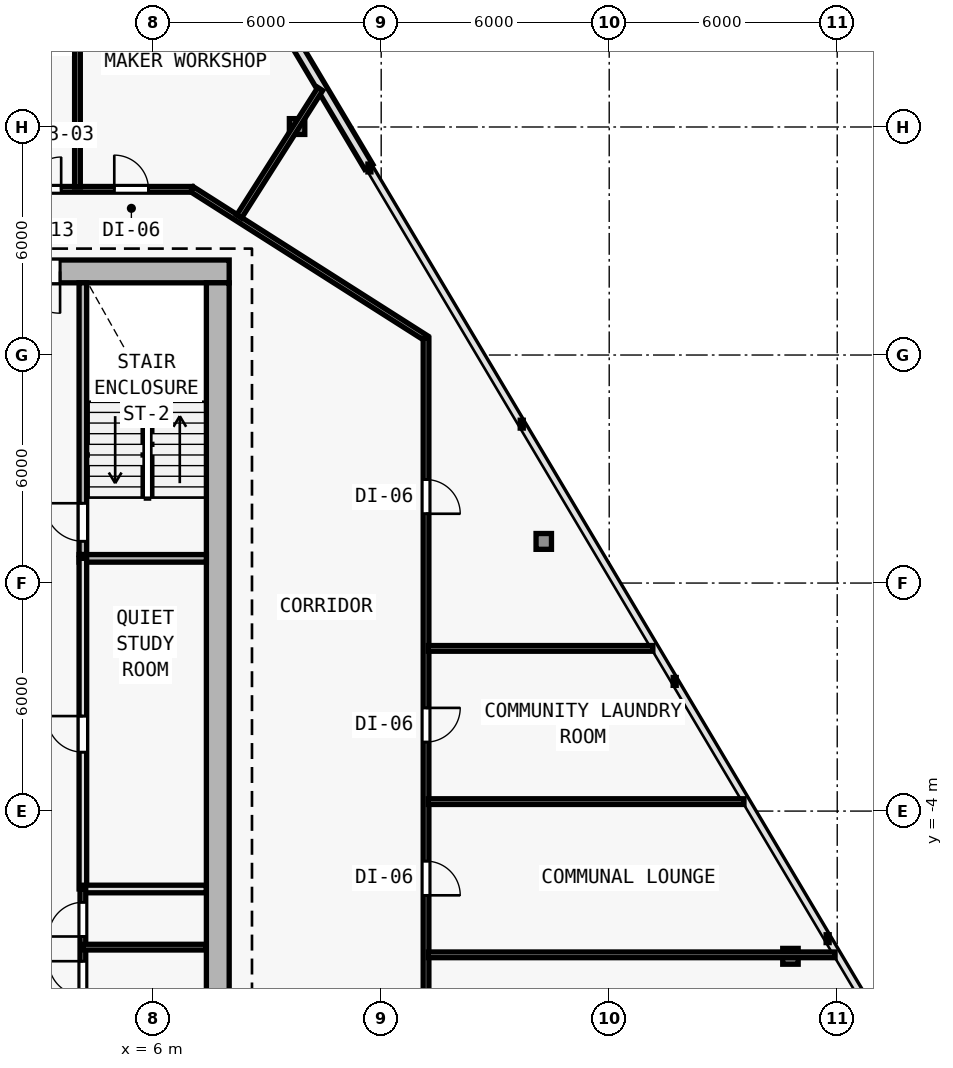
"""IFC4 building model, lengths in metres.
Left out: names, types, materials, properties, quantities, classifications, styles, units other than length and angle.
Written with IfcOpenShell. Run it as: python <this file> out.ifc"""

import sys

from ifc_helpers import new_model, si_unit, direction, frame, frame_2d, origin, origin_2d, place, context, subcontext, project, spatial, rectangle, i_section, extrude, element, fill, save


model = new_model("IFC4")
c1 = context("Model", 3, precision=1e-05, world=origin(), true_north=direction((0.0, 1.0)))
c2 = subcontext(c1, "Body", "Model", "MODEL_VIEW")
j1 = project(units=[si_unit("LENGTHUNIT", "METRE"), si_unit("PLANEANGLEUNIT", "RADIAN")], contexts=[c1])
p1 = place(None, origin())
s1 = spatial("IfcSite", under=j1, at=p1, CompositionType="ELEMENT")
p2 = place(p1, origin())
s2 = spatial("IfcBuilding", under=s1, at=p2, CompositionType="ELEMENT")
p3 = place(p2, frame((0.0, 0.0, 122.1)))
s3 = spatial("IfcBuildingStorey", under=s2, at=p3, CompositionType="ELEMENT", Elevation=122.1)
for number, where, z_axis, x_axis in (
    (1, (7.7, 10.2, 0.0), (0.0, 0.0, 1.0), (1.0, 0.0, 0.0)),
    (2, (7.7, 0.4, 0.0), (0.0, 0.0, 1.0), (1.0, 0.0, 0.0)),
):
    element("IfcColumn", number, at=place(p3, frame(where, z_axis=z_axis, x_axis=x_axis)), inside=s3, PredefinedType="COLUMN", context=c2, shape_type="SweptSolid", body=[
        extrude(i_section(OverallWidth=0.409, OverallDepth=0.425, WebThickness=0.021, FlangeThickness=0.034, FilletRadius=0.015, at=origin_2d()), origin(), (0.0, 0.0, 1.0), 3.6),
    ])
p4 = place(p3, frame((22.769, -7.821, 0.005), z_axis=(-0.026105663043, 0.021618752208, 0.999425396871), x_axis=(-0.637813971185, -0.770190455771, 0.0)))
e3 = element("IfcColumn", 3, at=p4, inside=s3, PredefinedType="COLUMN", context=c2, shape_type="SweptSolid", body=[
    extrude(i_section(OverallWidth=0.406, OverallDepth=0.416, WebThickness=0.019, FlangeThickness=0.031, FilletRadius=0.015, at=origin_2d()), origin(), (0.0, 0.0, 1.0), 3.591),
])
p5 = place(p3, frame((16.278, 3.096, 0.005), z_axis=(-0.018906041, 0.009521027842, 0.999775930718), x_axis=(-0.449781931574, -0.893138406984, 0.0)))
e4 = element("IfcColumn", 4, at=p5, inside=s3, PredefinedType="COLUMN", context=c2, shape_type="SweptSolid", body=[
    extrude(i_section(OverallWidth=0.406, OverallDepth=0.416, WebThickness=0.019, FlangeThickness=0.031, FilletRadius=0.015, at=origin_2d()), origin(), (0.0, 0.0, 1.0), 3.59),
])
p6 = place(p3, frame((9.787, 14.012, 0.005), z_axis=(-0.011767054935, -0.002516653368, 0.999927598816), x_axis=(0.209143047003, -0.977885057607, 0.0)))
e5 = element("IfcColumn", 5, at=p6, inside=s3, PredefinedType="COLUMN", context=c2, shape_type="SweptSolid", body=[
    extrude(i_section(OverallWidth=0.406, OverallDepth=0.416, WebThickness=0.019, FlangeThickness=0.031, FilletRadius=0.015, at=origin_2d()), origin(), (0.0, 0.0, 1.0), 3.589),
])
p7 = place(p3, frame((6.017, 22.462, 0.0), z_axis=(0.0, 0.0, 1.0), x_axis=(0.511085523564, -0.859529864288, 0.0)))
e6 = element("IfcWall", 6, at=p7, inside=s3, PredefinedType="SOLIDWALL", context=c2, shape_type="SweptSolid", body=[
    extrude(rectangle(XDim=11.068, YDim=0.25, at=frame_2d((5.534, 0.0))), origin(), (0.0, 0.0, 1.0), 3.35),
])
p8 = place(p7, frame((4.634, 0.0, 0.62)))
e7 = element("IfcOpeningElement", 7, at=p8, cuts=e6, PredefinedType="OPENING", context=c2, shape_type="SweptSolid", body=[
    extrude(rectangle(XDim=1.8, YDim=2.1, at=frame_2d((0.9, 1.05))), frame((0.0, 0.135, 0.0), z_axis=(0.0, -1.0, 0.0), x_axis=(1.0, 0.0, 0.0)), (0.0, 0.0, 1.0), 0.27),
])
p9 = place(p3, frame((8.0, 10.2, 0.0), z_axis=(0.0, 0.0, 1.0), x_axis=(-1.0, 0.0, 0.0)))
e8 = element("IfcWall", 8, at=p9, inside=s3, PredefinedType="SHEAR", context=c2, shape_type="SweptSolid", body=[
    extrude(rectangle(XDim=16.0, YDim=0.6, at=frame_2d((8.0, 0.0))), origin(), (0.0, 0.0, 1.0), 3.35),
])
p10 = place(p9, frame((4.45, 0.0, 0.0)))
e9 = element("IfcOpeningElement", 9, at=p10, cuts=e8, PredefinedType="OPENING", context=c2, shape_type="SweptSolid", body=[
    extrude(rectangle(XDim=1.1, YDim=2.15, at=frame_2d((0.55, 1.075))), frame((0.0, 0.31, 0.0), z_axis=(0.0, -1.0, 0.0), x_axis=(1.0, 0.0, 0.0)), (0.0, 0.0, 1.0), 0.62),
])
p11 = place(p3, frame((7.7, 9.9, 0.0), z_axis=(0.0, 0.0, 1.0), x_axis=(0.0, -1.0, 0.0)))
e10 = element("IfcWall", 10, at=p11, inside=s3, PredefinedType="SHEAR", context=c2, shape_type="SweptSolid", body=[
    extrude(rectangle(XDim=19.0, YDim=0.6, at=frame_2d((9.5, 0.0))), origin(), (0.0, 0.0, 1.0), 3.35),
])
p12 = place(p3, frame((4.15, 2.75, 0.0), z_axis=(0.0, 0.0, 1.0), x_axis=(0.0, 1.0, 0.0)))
e11 = element("IfcWall", 11, at=p12, inside=s3, PredefinedType="SOLIDWALL", context=c2, shape_type="SweptSolid", body=[
    extrude(rectangle(XDim=7.15, YDim=0.2, at=frame_2d((3.575, 0.0))), origin(), (0.0, 0.0, 1.0), 3.35),
])
p13 = place(p12, frame((0.35, 0.0, 0.0)))
e12 = element("IfcOpeningElement", 12, at=p13, cuts=e11, PredefinedType="OPENING", context=c2, shape_type="SweptSolid", body=[
    extrude(rectangle(XDim=1.0, YDim=2.15, at=frame_2d((0.5, 1.075))), frame((0.0, 0.11, 0.0), z_axis=(0.0, -1.0, 0.0), x_axis=(1.0, 0.0, 0.0)), (0.0, 0.0, 1.0), 0.22),
])
p14 = place(p3, frame((4.05, 2.65, 0.0), z_axis=(0.0, 0.0, 1.0), x_axis=(1.0, 0.0, 0.0)))
e13 = element("IfcWall", 13, at=p14, inside=s3, PredefinedType="SOLIDWALL", context=c2, shape_type="SweptSolid", body=[
    extrude(rectangle(XDim=3.35, YDim=0.2, at=frame_2d((1.675, 0.0))), origin(), (0.0, 0.0, 1.0), 3.35),
])
p15 = place(p3, frame((4.15, -6.05, 0.0), z_axis=(0.0, 0.0, 1.0), x_axis=(0.0, 1.0, 0.0)))
e14 = element("IfcWall", 14, at=p15, inside=s3, PredefinedType="SOLIDWALL", context=c2, shape_type="SweptSolid", body=[
    extrude(rectangle(XDim=8.7, YDim=0.2, at=frame_2d((4.35, 0.0))), origin(), (0.0, 0.0, 1.0), 3.35),
])
p16 = place(p15, frame((3.6, 0.0, 0.0)))
e15 = element("IfcOpeningElement", 15, at=p16, cuts=e14, PredefinedType="OPENING", context=c2, shape_type="SweptSolid", body=[
    extrude(rectangle(XDim=0.95, YDim=2.1, at=frame_2d((0.475, 1.05))), frame((0.0, 0.11, 0.0), z_axis=(0.0, -1.0, 0.0), x_axis=(1.0, 0.0, 0.0)), (0.0, 0.0, 1.0), 0.22),
])
p17 = place(p3, frame((4.15, -6.05, 0.0), z_axis=(0.0, 0.0, 1.0), x_axis=(1.0, 0.0, 0.0)))
e16 = element("IfcWall", 16, at=p17, inside=s3, PredefinedType="SOLIDWALL", context=c2, shape_type="SweptSolid", body=[
    extrude(rectangle(XDim=3.245, YDim=0.2, at=frame_2d((1.623, 0.0))), origin(), (0.0, 0.0, 1.0), 3.35),
])
p18 = place(p3, frame((4.15, -9.095, 0.0), z_axis=(0.0, 0.0, 1.0), x_axis=(0.0, 1.0, 0.0)))
e17 = element("IfcWall", 17, at=p18, inside=s3, PredefinedType="PARTITIONING", context=c2, shape_type="SweptSolid", body=[
    extrude(rectangle(XDim=3.045, YDim=0.15, at=frame_2d((1.522, 0.0))), origin(), (0.0, 0.0, 1.0), 3.35),
])
p19 = place(p18, frame((0.245, 0.0, 0.0)))
e18 = element("IfcOpeningElement", 18, at=p19, cuts=e17, PredefinedType="OPENING", context=c2, shape_type="SweptSolid", body=[
    extrude(rectangle(XDim=0.9, YDim=2.1, at=frame_2d((0.45, 1.05))), frame((0.0, 0.085, 0.0), z_axis=(0.0, -1.0, 0.0), x_axis=(1.0, 0.0, 0.0)), (0.0, 0.0, 1.0), 0.17),
])
p20 = place(p18, frame((1.795, 0.0, 0.0)))
e19 = element("IfcOpeningElement", 19, at=p20, cuts=e17, PredefinedType="OPENING", context=c2, shape_type="SweptSolid", body=[
    extrude(rectangle(XDim=0.9, YDim=2.1, at=frame_2d((0.45, 1.05))), frame((0.0, 0.085, 0.0), z_axis=(0.0, -1.0, 0.0), x_axis=(1.0, 0.0, 0.0)), (0.0, 0.0, 1.0), 0.17),
])
p21 = place(p3, frame((4.15, -7.58, 0.0), z_axis=(0.0, 0.0, 1.0), x_axis=(1.0, 0.0, 0.0)))
e20 = element("IfcWall", 20, at=p21, inside=s3, PredefinedType="PARTITIONING", context=c2, shape_type="SweptSolid", body=[
    extrude(rectangle(XDim=3.245, YDim=0.15, at=frame_2d((1.623, 0.0))), origin(), (0.0, 0.0, 1.0), 3.35),
])
p22 = place(p3, frame((-7.041, 12.36, 0.0), z_axis=(0.0, 0.0, 1.0), x_axis=(1.0, 0.0, 0.0)))
e21 = element("IfcWall", 21, at=p22, inside=s3, PredefinedType="PARTITIONING", context=c2, shape_type="SweptSolid", body=[
    extrude(rectangle(XDim=14.064, YDim=0.15, at=frame_2d((7.032, 0.0))), origin(), (0.0, 0.0, 1.0), 3.35),
])
p23 = place(p22, frame((12.017, 0.0, 0.0)))
e22 = element("IfcOpeningElement", 22, at=p23, cuts=e21, PredefinedType="OPENING", context=c2, shape_type="SweptSolid", body=[
    extrude(rectangle(XDim=0.9, YDim=2.1, at=frame_2d((0.45, 1.05))), frame((0.0, 0.085, 0.0), z_axis=(0.0, -1.0, 0.0), x_axis=(1.0, 0.0, 0.0)), (0.0, 0.0, 1.0), 0.17),
])
p24 = place(p22, frame((9.77, 0.0, 0.0)))
e23 = element("IfcOpeningElement", 23, at=p24, cuts=e21, PredefinedType="OPENING", context=c2, shape_type="SweptSolid", body=[
    extrude(rectangle(XDim=0.85, YDim=2.1, at=frame_2d((0.425, 1.05))), frame((0.0, 0.085, 0.0), z_axis=(0.0, -1.0, 0.0), x_axis=(1.0, 0.0, 0.0)), (0.0, 0.0, 1.0), 0.17),
])
p25 = place(p22, frame((8.112, 0.0, 0.0)))
e24 = element("IfcOpeningElement", 24, at=p25, cuts=e21, PredefinedType="OPENING", context=c2, shape_type="SweptSolid", body=[
    extrude(rectangle(XDim=0.85, YDim=2.1, at=frame_2d((0.425, 1.05))), frame((0.0, 0.085, 0.0), z_axis=(0.0, -1.0, 0.0), x_axis=(1.0, 0.0, 0.0)), (0.0, 0.0, 1.0), 0.17),
])
p26 = place(p22, frame((3.506, 0.0, 0.0)))
e25 = element("IfcOpeningElement", 25, at=p26, cuts=e21, PredefinedType="OPENING", context=c2, shape_type="SweptSolid", body=[
    extrude(rectangle(XDim=0.9, YDim=2.1, at=frame_2d((0.45, 1.05))), frame((0.0, 0.085, 0.0), z_axis=(0.0, -1.0, 0.0), x_axis=(1.0, 0.0, 0.0)), (0.0, 0.0, 1.0), 0.17),
])
p27 = place(p3, frame((7.023, 12.36, 0.0), z_axis=(0.0, 0.0, 1.0), x_axis=(0.84376480085, -0.536713108511, 0.0)))
e26 = element("IfcWall", 26, at=p27, inside=s3, PredefinedType="PARTITIONING", context=c2, shape_type="SweptSolid", body=[
    extrude(rectangle(XDim=7.297, YDim=0.15, at=frame_2d((3.648, 0.0))), origin(), (0.0, 0.0, 1.0), 2.875),
])
p28 = place(p3, frame((13.18, 8.444, 0.0), z_axis=(0.0, 0.0, 1.0), x_axis=(0.0, -1.0, 0.0)))
e27 = element("IfcWall", 27, at=p28, inside=s3, PredefinedType="PARTITIONING", context=c2, shape_type="SweptSolid", body=[
    extrude(rectangle(XDim=20.004, YDim=0.15, at=frame_2d((10.002, 0.0))), origin(), (0.0, 0.0, 1.0), 2.705),
])
p29 = place(p28, frame((13.76, 0.0, 0.0)))
e28 = element("IfcOpeningElement", 28, at=p29, cuts=e27, PredefinedType="OPENING", context=c2, shape_type="SweptSolid", body=[
    extrude(rectangle(XDim=0.9, YDim=2.1, at=frame_2d((0.45, 1.05))), frame((0.0, 0.085, 0.0), z_axis=(0.0, -1.0, 0.0), x_axis=(1.0, 0.0, 0.0)), (0.0, 0.0, 1.0), 0.17),
])
p30 = place(p28, frame((9.729, 0.0, 0.0)))
e29 = element("IfcOpeningElement", 29, at=p30, cuts=e27, PredefinedType="OPENING", context=c2, shape_type="SweptSolid", body=[
    extrude(rectangle(XDim=0.9, YDim=2.1, at=frame_2d((0.45, 1.05))), frame((0.0, 0.085, 0.0), z_axis=(0.0, -1.0, 0.0), x_axis=(1.0, 0.0, 0.0)), (0.0, 0.0, 1.0), 0.17),
])
p31 = place(p28, frame((3.721, 0.0, 0.0)))
e30 = element("IfcOpeningElement", 30, at=p31, cuts=e27, PredefinedType="OPENING", context=c2, shape_type="SweptSolid", body=[
    extrude(rectangle(XDim=0.9, YDim=2.1, at=frame_2d((0.45, 1.05))), frame((0.0, 0.085, 0.0), z_axis=(0.0, -1.0, 0.0), x_axis=(1.0, 0.0, 0.0)), (0.0, 0.0, 1.0), 0.17),
])
p32 = place(p3, frame((13.24, -7.782, 0.0), z_axis=(0.0, 0.0, 1.0), x_axis=(1.0, 0.0, 0.0)))
e31 = element("IfcWall", 31, at=p32, inside=s3, PredefinedType="PARTITIONING", context=c2, shape_type="SweptSolid", body=[
    extrude(rectangle(XDim=10.703, YDim=0.15, at=frame_2d((5.352, 0.0))), origin(), (0.0, 0.0, 1.0), 2.705),
])
p33 = place(p3, frame((8.262, 11.643, 0.0), z_axis=(0.0, 0.0, 1.0), x_axis=(0.536696759346, 0.843775200221, 0.0)))
e32 = element("IfcWall", 32, at=p33, inside=s3, PredefinedType="PARTITIONING", context=c2, shape_type="SweptSolid", body=[
    extrude(rectangle(XDim=3.978, YDim=0.15, at=frame_2d((1.989, 0.0))), origin(), (0.0, 0.0, 1.0), 2.875),
])
p34 = place(p3, frame((13.24, 0.281, 0.0), z_axis=(0.0, 0.0, 1.0), x_axis=(1.0, 0.0, 0.0)))
e33 = element("IfcWall", 33, at=p34, inside=s3, PredefinedType="PARTITIONING", context=c2, shape_type="SweptSolid", body=[
    extrude(rectangle(XDim=5.908, YDim=0.15, at=frame_2d((2.954, 0.0))), origin(), (0.0, 0.0, 1.0), 2.825),
])
p35 = place(p3, frame((4.008, 12.42, 0.0), z_axis=(0.0, 0.0, 1.0), x_axis=(0.0, 1.0, 0.0)))
e34 = element("IfcWall", 34, at=p35, inside=s3, PredefinedType="PARTITIONING", context=c2, shape_type="SweptSolid", body=[
    extrude(rectangle(XDim=8.93, YDim=0.15, at=frame_2d((4.465, 0.0))), origin(), (0.0, 0.0, 1.0), 2.885),
])
p36 = place(p3, frame((13.24, -3.75, 0.0), z_axis=(0.0, 0.0, 1.0), x_axis=(0.999999999568, -2.9394474e-05, 0.0)))
e35 = element("IfcWall", 35, at=p36, inside=s3, PredefinedType="PARTITIONING", context=c2, shape_type="SweptSolid", body=[
    extrude(rectangle(XDim=8.306, YDim=0.15, at=frame_2d((4.153, 0.0))), origin(), (0.0, 0.0, 1.0), 2.825),
])
p37 = place(p10, origin())
e36 = element("IfcDoor", 36, at=p37, inside=s3, OperationType="SINGLE_SWING_LEFT", PredefinedType="DOOR", context=c2, shape_type="SweptSolid", body=[
    extrude(rectangle(XDim=1.1, YDim=2.15, at=frame_2d((0.55, 1.075))), frame((0.0, 0.025, 0.0), z_axis=(0.0, -1.0, 0.0), x_axis=(1.0, 0.0, 0.0)), (0.0, 0.0, 1.0), 0.05),
])
fill(e9, e36)
p38 = place(p13, origin())
e37 = element("IfcDoor", 37, at=p38, inside=s3, OperationType="SINGLE_SWING_RIGHT", PredefinedType="DOOR", context=c2, shape_type="SweptSolid", body=[
    extrude(rectangle(XDim=1.0, YDim=2.15, at=frame_2d((0.5, 1.075))), frame((0.0, 0.025, 0.0), z_axis=(0.0, -1.0, 0.0), x_axis=(1.0, 0.0, 0.0)), (0.0, 0.0, 1.0), 0.05),
])
fill(e12, e37)
p39 = place(p16, origin())
e38 = element("IfcDoor", 38, at=p39, inside=s3, OperationType="SINGLE_SWING_RIGHT", PredefinedType="DOOR", context=c2, shape_type="SweptSolid", body=[
    extrude(rectangle(XDim=0.95, YDim=2.1, at=frame_2d((0.475, 1.05))), frame((0.0, 0.025, 0.0), z_axis=(0.0, -1.0, 0.0), x_axis=(1.0, 0.0, 0.0)), (0.0, 0.0, 1.0), 0.05),
])
fill(e15, e38)
p40 = place(p19, origin())
e39 = element("IfcDoor", 39, at=p40, inside=s3, OperationType="SINGLE_SWING_RIGHT", PredefinedType="DOOR", context=c2, shape_type="SweptSolid", body=[
    extrude(rectangle(XDim=0.9, YDim=2.1, at=frame_2d((0.45, 1.05))), frame((0.0, 0.025, 0.0), z_axis=(0.0, -1.0, 0.0), x_axis=(1.0, 0.0, 0.0)), (0.0, 0.0, 1.0), 0.05),
])
fill(e18, e39)
p41 = place(p20, origin())
e40 = element("IfcDoor", 40, at=p41, inside=s3, OperationType="SINGLE_SWING_LEFT", PredefinedType="DOOR", context=c2, shape_type="SweptSolid", body=[
    extrude(rectangle(XDim=0.9, YDim=2.1, at=frame_2d((0.45, 1.05))), frame((0.0, 0.025, 0.0), z_axis=(0.0, -1.0, 0.0), x_axis=(1.0, 0.0, 0.0)), (0.0, 0.0, 1.0), 0.05),
])
fill(e19, e40)
p42 = place(p29, origin())
e41 = element("IfcDoor", 41, at=p42, inside=s3, OperationType="SINGLE_SWING_RIGHT", PredefinedType="DOOR", context=c2, shape_type="SweptSolid", body=[
    extrude(rectangle(XDim=0.9, YDim=2.1, at=frame_2d((0.45, 1.05))), frame((0.0, 0.025, 0.0), z_axis=(0.0, -1.0, 0.0), x_axis=(1.0, 0.0, 0.0)), (0.0, 0.0, 1.0), 0.05),
])
fill(e28, e41)
p43 = place(p30, origin())
e42 = element("IfcDoor", 42, at=p43, inside=s3, OperationType="SINGLE_SWING_LEFT", PredefinedType="DOOR", context=c2, shape_type="SweptSolid", body=[
    extrude(rectangle(XDim=0.9, YDim=2.1, at=frame_2d((0.45, 1.05))), frame((0.0, 0.025, 0.0), z_axis=(0.0, -1.0, 0.0), x_axis=(1.0, 0.0, 0.0)), (0.0, 0.0, 1.0), 0.05),
])
fill(e29, e42)
p44 = place(p31, origin())
e43 = element("IfcDoor", 43, at=p44, inside=s3, OperationType="SINGLE_SWING_RIGHT", PredefinedType="DOOR", context=c2, shape_type="SweptSolid", body=[
    extrude(rectangle(XDim=0.9, YDim=2.1, at=frame_2d((0.45, 1.05))), frame((0.0, 0.025, 0.0), z_axis=(0.0, -1.0, 0.0), x_axis=(1.0, 0.0, 0.0)), (0.0, 0.0, 1.0), 0.05),
])
fill(e30, e43)
p45 = place(p23, origin())
e44 = element("IfcDoor", 44, at=p45, inside=s3, OperationType="SINGLE_SWING_LEFT", PredefinedType="DOOR", context=c2, shape_type="SweptSolid", body=[
    extrude(rectangle(XDim=0.9, YDim=2.1, at=frame_2d((0.45, 1.05))), frame((0.0, 0.025, 0.0), z_axis=(0.0, -1.0, 0.0), x_axis=(1.0, 0.0, 0.0)), (0.0, 0.0, 1.0), 0.05),
])
fill(e22, e44)
p46 = place(p24, origin())
e45 = element("IfcDoor", 45, at=p46, inside=s3, OperationType="SINGLE_SWING_RIGHT", PredefinedType="DOOR", context=c2, shape_type="SweptSolid", body=[
    extrude(rectangle(XDim=0.85, YDim=2.1, at=frame_2d((0.425, 1.05))), frame((0.0, 0.025, 0.0), z_axis=(0.0, -1.0, 0.0), x_axis=(1.0, 0.0, 0.0)), (0.0, 0.0, 1.0), 0.05),
])
fill(e23, e45)
save(model, sys.argv[1])
